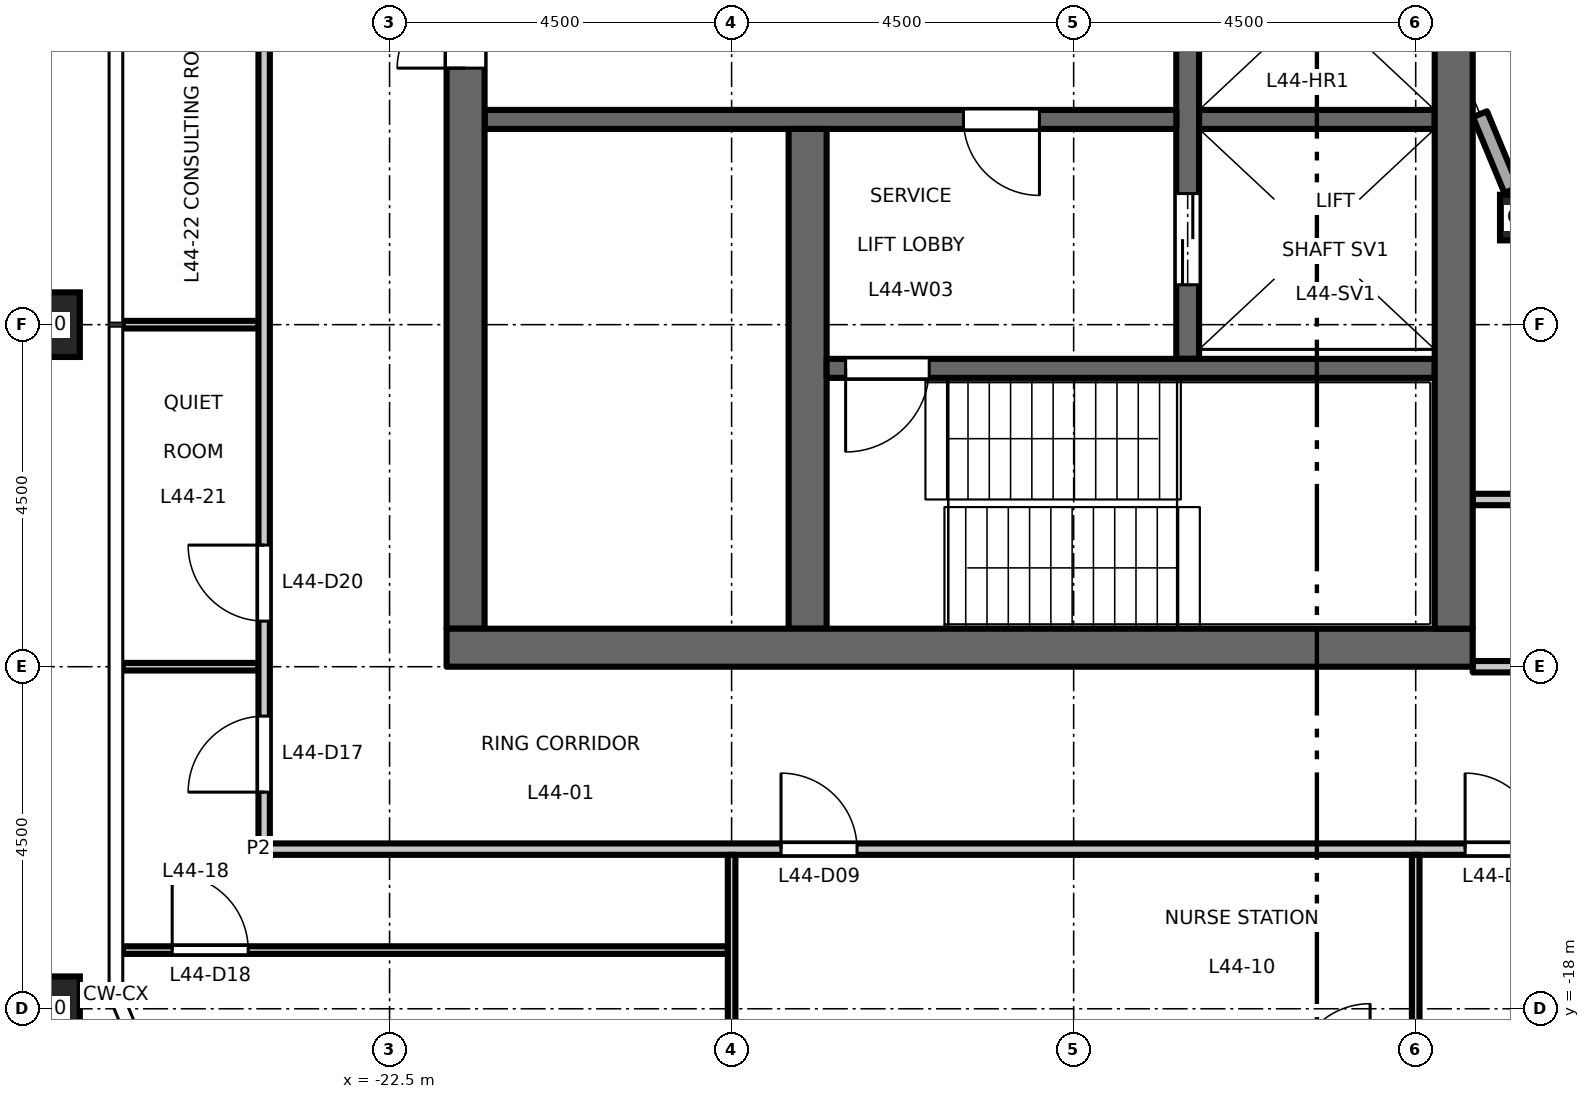
"""IFC4 building model, lengths in metres.
Left out: names, types, materials, properties, quantities, classifications, styles, units other than length and angle.
Written with IfcOpenShell. Run it as: python <this file> out.ifc"""

import sys

from ifc_helpers import new_model, si_unit, direction, frame, frame_2d, origin, origin_2d, place, context, subcontext, project, spatial, rectangle, hollow_rectangle, extrude, element, fill, save


model = new_model("IFC4")
c1 = context("Model", 3, precision=1e-05, world=origin(), true_north=direction((0.0, 1.0)))
c2 = subcontext(c1, "Body", "Model", "MODEL_VIEW")
j1 = project(units=[si_unit("LENGTHUNIT", "METRE"), si_unit("PLANEANGLEUNIT", "RADIAN")], contexts=[c1])
p1 = place(None, origin())
s1 = spatial("IfcSite", under=j1, at=p1, CompositionType="ELEMENT")
p2 = place(p1, origin())
s2 = spatial("IfcBuilding", under=s1, at=p2, CompositionType="ELEMENT")
p3 = place(p2, frame((0.0, 0.0, 206.2)))
s3 = spatial("IfcBuildingStorey", under=s2, at=p3, CompositionType="ELEMENT", Elevation=206.2)
for number, where, z_axis, x_axis in (
    (1, (-27.0, -9.0, 0.0), (0.0, 0.0, 1.0), (1.0, 0.0, 0.0)),
    (2, (-27.0, -18.0, 0.0), (0.0, 0.0, 1.0), (1.0, 0.0, 0.0)),
):
    element("IfcColumn", number, at=place(p3, frame(where, z_axis=z_axis, x_axis=x_axis)), inside=s3, PredefinedType="COLUMN", context=c2, shape_type="SweptSolid", body=[
        extrude(hollow_rectangle(XDim=0.85, YDim=0.85, WallThickness=0.05, at=origin_2d()), origin(), (0.0, 0.0, 1.0), 4.5),
    ])
p4 = place(p3, frame((-7.591, -7.591, 0.0), z_axis=(0.0, 0.0, 1.0), x_axis=(1.0, 0.0, 0.0)))
e3 = element("IfcColumn", 3, at=p4, inside=s3, PredefinedType="COLUMN", context=c2, shape_type="SweptSolid", body=[
    extrude(hollow_rectangle(XDim=0.6, YDim=0.6, WallThickness=0.032, at=origin_2d()), origin(), (0.0, 0.0, 1.0), 4.5),
])
p5 = place(p3, frame((-12.0, -9.45, 0.0), z_axis=(0.0, 0.0, 1.0), x_axis=(0.0, 1.0, 0.0)))
e4 = element("IfcWall", 4, at=p5, inside=s3, PredefinedType="SHEAR", context=c2, shape_type="SweptSolid", body=[
    extrude(rectangle(XDim=18.9, YDim=0.3, at=frame_2d((9.45, 0.0))), origin(), (0.0, 0.0, 1.0), 4.35),
])
p6 = place(p5, frame((4.725, 0.0, 0.0)))
e5 = element("IfcOpeningElement", 5, at=p6, cuts=e4, PredefinedType="OPENING", context=c2, shape_type="SweptSolid", body=[
    extrude(rectangle(XDim=1.1, YDim=2.1, at=frame_2d((0.55, 1.05))), frame((0.0, 0.16, 0.0), z_axis=(0.0, -1.0, 0.0), x_axis=(1.0, 0.0, 0.0)), (0.0, 0.0, 1.0), 0.32),
])
p7 = place(p5, frame((7.875, 0.0, 0.0)))
e6 = element("IfcOpeningElement", 6, at=p7, cuts=e4, PredefinedType="OPENING", context=c2, shape_type="SweptSolid", body=[
    extrude(rectangle(XDim=1.1, YDim=2.1, at=frame_2d((0.55, 1.05))), frame((0.0, 0.16, 0.0), z_axis=(0.0, -1.0, 0.0), x_axis=(1.0, 0.0, 0.0)), (0.0, 0.0, 1.0), 0.32),
])
p8 = place(p5, frame((11.025, 0.0, 0.0)))
e7 = element("IfcOpeningElement", 7, at=p8, cuts=e4, PredefinedType="OPENING", context=c2, shape_type="SweptSolid", body=[
    extrude(rectangle(XDim=1.1, YDim=2.1, at=frame_2d((0.55, 1.05))), frame((0.0, 0.16, 0.0), z_axis=(0.0, -1.0, 0.0), x_axis=(1.0, 0.0, 0.0)), (0.0, 0.0, 1.0), 0.32),
])
p9 = place(p5, frame((14.175, 0.0, 0.0)))
e8 = element("IfcOpeningElement", 8, at=p9, cuts=e4, PredefinedType="OPENING", context=c2, shape_type="SweptSolid", body=[
    extrude(rectangle(XDim=1.1, YDim=2.1, at=frame_2d((0.55, 1.05))), frame((0.0, 0.16, 0.0), z_axis=(0.0, -1.0, 0.0), x_axis=(1.0, 0.0, 0.0)), (0.0, 0.0, 1.0), 0.32),
])
p10 = place(p5, frame((16.725, 0.0, 0.0)))
e9 = element("IfcOpeningElement", 9, at=p10, cuts=e4, PredefinedType="OPENING", context=c2, shape_type="SweptSolid", body=[
    extrude(rectangle(XDim=1.2, YDim=2.1, at=frame_2d((0.6, 1.05))), frame((0.0, 0.16, 0.0), z_axis=(0.0, -1.0, 0.0), x_axis=(1.0, 0.0, 0.0)), (0.0, 0.0, 1.0), 0.32),
])
p11 = place(p5, frame((0.975, 0.0, 0.0)))
e10 = element("IfcOpeningElement", 10, at=p11, cuts=e4, PredefinedType="OPENING", context=c2, shape_type="SweptSolid", body=[
    extrude(rectangle(XDim=1.2, YDim=2.1, at=frame_2d((0.6, 1.05))), frame((0.0, 0.16, 0.0), z_axis=(0.0, -1.0, 0.0), x_axis=(1.0, 0.0, 0.0)), (0.0, 0.0, 1.0), 0.32),
])
p12 = place(p3, frame((-12.15, -6.3, 0.0), z_axis=(0.0, 0.0, 1.0), x_axis=(-1.0, 0.0, 0.0)))
e11 = element("IfcWall", 11, at=p12, inside=s3, PredefinedType="SHEAR", context=c2, shape_type="SweptSolid", body=[
    extrude(rectangle(XDim=9.1, YDim=0.25, at=frame_2d((4.55, 0.0))), origin(), (0.0, 0.0, 1.0), 4.35),
])
p13 = place(p12, frame((1.8, 0.0, 0.0)))
e12 = element("IfcOpeningElement", 12, at=p13, cuts=e11, PredefinedType="OPENING", context=c2, shape_type="SweptSolid", body=[
    extrude(rectangle(XDim=1.0, YDim=2.1, at=frame_2d((0.5, 1.05))), frame((0.0, 0.135, 0.0), z_axis=(0.0, -1.0, 0.0), x_axis=(1.0, 0.0, 0.0)), (0.0, 0.0, 1.0), 0.27),
])
p14 = place(p3, frame((-21.5, -13.0, 0.0), z_axis=(0.0, 0.0, 1.0), x_axis=(0.0, 1.0, 0.0)))
e13 = element("IfcWall", 13, at=p14, inside=s3, PredefinedType="SHEAR", context=c2, shape_type="SweptSolid", body=[
    extrude(rectangle(XDim=26.0, YDim=0.5, at=frame_2d((13.0, 0.0))), origin(), (0.0, 0.0, 1.0), 4.35),
])
p15 = place(p14, frame((16.825, 0.0, 0.0)))
e14 = element("IfcOpeningElement", 14, at=p15, cuts=e13, PredefinedType="OPENING", context=c2, shape_type="SweptSolid", body=[
    extrude(rectangle(XDim=1.8, YDim=2.1, at=frame_2d((0.9, 1.05))), frame((0.0, 0.26, 0.0), z_axis=(0.0, -1.0, 0.0), x_axis=(1.0, 0.0, 0.0)), (0.0, 0.0, 1.0), 0.52),
])
p16 = place(p14, frame((7.375, 0.0, 0.0)))
e15 = element("IfcOpeningElement", 15, at=p16, cuts=e13, PredefinedType="OPENING", context=c2, shape_type="SweptSolid", body=[
    extrude(rectangle(XDim=1.8, YDim=2.1, at=frame_2d((0.9, 1.05))), frame((0.0, 0.26, 0.0), z_axis=(0.0, -1.0, 0.0), x_axis=(1.0, 0.0, 0.0)), (0.0, 0.0, 1.0), 0.52),
])
p17 = place(p14, frame((14.125, 0.0, 0.0)))
e16 = element("IfcOpeningElement", 16, at=p17, cuts=e13, PredefinedType="OPENING", context=c2, shape_type="SweptSolid", body=[
    extrude(rectangle(XDim=0.9, YDim=2.1, at=frame_2d((0.45, 1.05))), frame((0.0, 0.26, 0.0), z_axis=(0.0, -1.0, 0.0), x_axis=(1.0, 0.0, 0.0)), (0.0, 0.0, 1.0), 0.52),
])
p18 = place(p3, frame((-17.0, -13.0, 0.0), z_axis=(0.0, 0.0, 1.0), x_axis=(0.0, 1.0, 0.0)))
e17 = element("IfcWall", 17, at=p18, inside=s3, PredefinedType="SHEAR", context=c2, shape_type="SweptSolid", body=[
    extrude(rectangle(XDim=6.575, YDim=0.5, at=frame_2d((3.288, 0.0))), origin(), (0.0, 0.0, 1.0), 4.35),
])
p19 = place(p3, frame((-8.75, -6.3, 0.0), z_axis=(0.0, 0.0, 1.0), x_axis=(-1.0, 0.0, 0.0)))
e18 = element("IfcWall", 18, at=p19, inside=s3, PredefinedType="SHEAR", context=c2, shape_type="SweptSolid", body=[
    extrude(rectangle(XDim=3.1, YDim=0.25, at=frame_2d((1.55, 0.0))), origin(), (0.0, 0.0, 1.0), 4.35),
])
p20 = place(p3, frame((-8.75, -9.575, 0.0), z_axis=(0.0, 0.0, 1.0), x_axis=(-1.0, 0.0, 0.0)))
e19 = element("IfcWall", 19, at=p20, inside=s3, PredefinedType="SHEAR", context=c2, shape_type="SweptSolid", body=[
    extrude(rectangle(XDim=8.0, YDim=0.25, at=frame_2d((4.0, 0.0))), origin(), (0.0, 0.0, 1.0), 4.35),
])
p21 = place(p20, frame((6.65, 0.0, 0.0)))
e20 = element("IfcOpeningElement", 20, at=p21, cuts=e19, PredefinedType="OPENING", context=c2, shape_type="SweptSolid", body=[
    extrude(rectangle(XDim=1.1, YDim=2.1, at=frame_2d((0.55, 1.05))), frame((0.0, 0.135, 0.0), z_axis=(0.0, -1.0, 0.0), x_axis=(1.0, 0.0, 0.0)), (0.0, 0.0, 1.0), 0.27),
])
p22 = place(p3, frame((-8.25, -13.25, 0.0), z_axis=(0.0, 0.0, 1.0), x_axis=(-1.0, 0.0, 0.0)))
e21 = element("IfcWall", 21, at=p22, inside=s3, PredefinedType="SHEAR", context=c2, shape_type="SweptSolid", body=[
    extrude(rectangle(XDim=13.5, YDim=0.5, at=frame_2d((6.75, 0.0))), origin(), (0.0, 0.0, 1.0), 4.35),
])
p23 = place(p3, frame((-8.5, -13.0, 0.0), z_axis=(0.0, 0.0, 1.0), x_axis=(0.0, 1.0, 0.0)))
e22 = element("IfcWall", 22, at=p23, inside=s3, PredefinedType="SHEAR", context=c2, shape_type="SweptSolid", body=[
    extrude(rectangle(XDim=26.0, YDim=0.5, at=frame_2d((13.0, 0.0))), origin(), (0.0, 0.0, 1.0), 4.35),
])
p24 = place(p3, frame((-8.154, -6.231, 0.0), z_axis=(0.0, 0.0, 1.0), x_axis=(0.382704496366, -0.923870807235, 0.0)))
e23 = element("IfcWall", 23, at=p24, inside=s3, PredefinedType="STANDARD", context=c2, shape_type="SweptSolid", body=[
    extrude(rectangle(XDim=1.08, YDim=0.2, at=frame_2d((0.54, 0.0))), origin(), (0.0, 0.0, 1.0), 3.918),
])
p25 = place(p3, frame((-26.01, -17.228, 0.0), z_axis=(0.0, 0.0, 1.0), x_axis=(1.0, 0.0, 0.0)))
e24 = element("IfcWall", 24, at=p25, inside=s3, PredefinedType="PARTITIONING", context=c2, shape_type="SweptSolid", body=[
    extrude(rectangle(XDim=7.96, YDim=0.1, at=frame_2d((3.98, 0.0))), origin(), (0.0, 0.0, 1.0), 4.35),
])
p26 = place(p25, frame((0.65, 0.0, 0.0)))
e25 = element("IfcOpeningElement", 25, at=p26, cuts=e24, PredefinedType="OPENING", context=c2, shape_type="SweptSolid", body=[
    extrude(rectangle(XDim=1.0, YDim=2.1, at=frame_2d((0.5, 1.05))), frame((0.0, 0.06, 0.0), z_axis=(0.0, -1.0, 0.0), x_axis=(1.0, 0.0, 0.0)), (0.0, 0.0, 1.0), 0.12),
])
p27 = place(p3, frame((-24.225, -15.9, 0.0), z_axis=(0.0, 0.0, 1.0), x_axis=(1.0, 0.0, 0.0)))
e26 = element("IfcWall", 26, at=p27, inside=s3, PredefinedType="PARTITIONING", context=c2, shape_type="SweptSolid", body=[
    extrude(rectangle(XDim=48.45, YDim=0.15, at=frame_2d((24.225, 0.0))), origin(), (0.0, 0.0, 1.0), 4.35),
])
p28 = place(p27, frame((6.875, 0.0, 0.0)))
e27 = element("IfcOpeningElement", 27, at=p28, cuts=e26, PredefinedType="OPENING", context=c2, shape_type="SweptSolid", body=[
    extrude(rectangle(XDim=1.0, YDim=2.1, at=frame_2d((0.5, 1.05))), frame((0.0, 0.085, 0.0), z_axis=(0.0, -1.0, 0.0), x_axis=(1.0, 0.0, 0.0)), (0.0, 0.0, 1.0), 0.17),
])
p29 = place(p27, frame((15.875, 0.0, 0.0)))
e28 = element("IfcOpeningElement", 28, at=p29, cuts=e26, PredefinedType="OPENING", context=c2, shape_type="SweptSolid", body=[
    extrude(rectangle(XDim=1.0, YDim=2.1, at=frame_2d((0.5, 1.05))), frame((0.0, 0.085, 0.0), z_axis=(0.0, -1.0, 0.0), x_axis=(1.0, 0.0, 0.0)), (0.0, 0.0, 1.0), 0.17),
])
p30 = place(p27, frame((24.875, 0.0, 0.0)))
e29 = element("IfcOpeningElement", 29, at=p30, cuts=e26, PredefinedType="OPENING", context=c2, shape_type="SweptSolid", body=[
    extrude(rectangle(XDim=1.0, YDim=2.1, at=frame_2d((0.5, 1.05))), frame((0.0, 0.085, 0.0), z_axis=(0.0, -1.0, 0.0), x_axis=(1.0, 0.0, 0.0)), (0.0, 0.0, 1.0), 0.17),
])
p31 = place(p27, frame((40.625, 0.0, 0.0)))
e30 = element("IfcOpeningElement", 30, at=p31, cuts=e26, PredefinedType="OPENING", context=c2, shape_type="SweptSolid", body=[
    extrude(rectangle(XDim=1.0, YDim=2.1, at=frame_2d((0.5, 1.05))), frame((0.0, 0.085, 0.0), z_axis=(0.0, -1.0, 0.0), x_axis=(1.0, 0.0, 0.0)), (0.0, 0.0, 1.0), 0.17),
])
p32 = place(p27, frame((42.875, 0.0, 0.0)))
e31 = element("IfcOpeningElement", 31, at=p32, cuts=e26, PredefinedType="OPENING", context=c2, shape_type="SweptSolid", body=[
    extrude(rectangle(XDim=1.0, YDim=2.1, at=frame_2d((0.5, 1.05))), frame((0.0, 0.085, 0.0), z_axis=(0.0, -1.0, 0.0), x_axis=(1.0, 0.0, 0.0)), (0.0, 0.0, 1.0), 0.17),
])
p33 = place(p3, frame((-26.01, -13.5, 0.0), z_axis=(0.0, 0.0, 1.0), x_axis=(1.0, 0.0, 0.0)))
e32 = element("IfcWall", 32, at=p33, inside=s3, PredefinedType="PARTITIONING", context=c2, shape_type="SweptSolid", body=[
    extrude(rectangle(XDim=1.785, YDim=0.1, at=frame_2d((0.893, 0.0))), origin(), (0.0, 0.0, 1.0), 3.95),
])
p34 = place(p3, frame((-8.25, -13.5, 0.0), z_axis=(0.0, 0.0, 1.0), x_axis=(1.0, 0.0, 0.0)))
e33 = element("IfcWall", 33, at=p34, inside=s3, PredefinedType="PARTITIONING", context=c2, shape_type="SweptSolid", body=[
    extrude(rectangle(XDim=16.5, YDim=0.15, at=frame_2d((8.25, 0.0))), origin(), (0.0, 0.0, 1.0), 3.95),
])
p35 = place(p34, frame((0.6, 0.0, 0.0)))
e34 = element("IfcOpeningElement", 34, at=p35, cuts=e33, PredefinedType="OPENING", context=c2, shape_type="SweptSolid", body=[
    extrude(rectangle(XDim=1.0, YDim=2.1, at=frame_2d((0.5, 1.05))), frame((0.0, 0.085, 0.0), z_axis=(0.0, -1.0, 0.0), x_axis=(1.0, 0.0, 0.0)), (0.0, 0.0, 1.0), 0.17),
])
p36 = place(p3, frame((-8.25, -11.3, 0.0), z_axis=(0.0, 0.0, 1.0), x_axis=(1.0, 0.0, 0.0)))
e35 = element("IfcWall", 35, at=p36, inside=s3, PredefinedType="PARTITIONING", context=c2, shape_type="SweptSolid", body=[
    extrude(rectangle(XDim=14.79, YDim=0.15, at=frame_2d((7.395, 0.0))), origin(), (0.0, 0.0, 1.0), 4.35),
])
p37 = place(p36, frame((4.35, 0.0, 0.0)))
e36 = element("IfcOpeningElement", 36, at=p37, cuts=e35, PredefinedType="OPENING", context=c2, shape_type="SweptSolid", body=[
    extrude(rectangle(XDim=1.0, YDim=2.1, at=frame_2d((0.5, 1.05))), frame((0.0, 0.085, 0.0), z_axis=(0.0, -1.0, 0.0), x_axis=(1.0, 0.0, 0.0)), (0.0, 0.0, 1.0), 0.17),
])
p38 = place(p36, frame((6.6, 0.0, 0.0)))
e37 = element("IfcOpeningElement", 37, at=p38, cuts=e35, PredefinedType="OPENING", context=c2, shape_type="SweptSolid", body=[
    extrude(rectangle(XDim=1.0, YDim=2.1, at=frame_2d((0.5, 1.05))), frame((0.0, 0.085, 0.0), z_axis=(0.0, -1.0, 0.0), x_axis=(1.0, 0.0, 0.0)), (0.0, 0.0, 1.0), 0.17),
])
p39 = place(p36, frame((13.14, 0.0, 0.0)))
e38 = element("IfcOpeningElement", 38, at=p39, cuts=e35, PredefinedType="OPENING", context=c2, shape_type="SweptSolid", body=[
    extrude(rectangle(XDim=1.0, YDim=2.1, at=frame_2d((0.5, 1.05))), frame((0.0, 0.085, 0.0), z_axis=(0.0, -1.0, 0.0), x_axis=(1.0, 0.0, 0.0)), (0.0, 0.0, 1.0), 0.17),
])
p40 = place(p3, frame((-26.01, -9.0, 0.0), z_axis=(0.0, 0.0, 1.0), x_axis=(1.0, 0.0, 0.0)))
e39 = element("IfcWall", 39, at=p40, inside=s3, PredefinedType="PARTITIONING", context=c2, shape_type="SweptSolid", body=[
    extrude(rectangle(XDim=1.785, YDim=0.1, at=frame_2d((0.893, 0.0))), origin(), (0.0, 0.0, 1.0), 4.35),
])
p41 = place(p3, frame((-24.15, -15.825, 0.0), z_axis=(0.0, 0.0, 1.0), x_axis=(0.0, 1.0, 0.0)))
e40 = element("IfcWall", 40, at=p41, inside=s3, PredefinedType="PARTITIONING", context=c2, shape_type="SweptSolid", body=[
    extrude(rectangle(XDim=31.65, YDim=0.15, at=frame_2d((15.825, 0.0))), origin(), (0.0, 0.0, 1.0), 4.35),
])
p42 = place(p41, frame((0.675, 0.0, 0.0)))
e41 = element("IfcOpeningElement", 41, at=p42, cuts=e40, PredefinedType="OPENING", context=c2, shape_type="SweptSolid", body=[
    extrude(rectangle(XDim=1.0, YDim=2.1, at=frame_2d((0.5, 1.05))), frame((0.0, 0.085, 0.0), z_axis=(0.0, -1.0, 0.0), x_axis=(1.0, 0.0, 0.0)), (0.0, 0.0, 1.0), 0.17),
])
p43 = place(p41, frame((2.925, 0.0, 0.0)))
e42 = element("IfcOpeningElement", 42, at=p43, cuts=e40, PredefinedType="OPENING", context=c2, shape_type="SweptSolid", body=[
    extrude(rectangle(XDim=1.0, YDim=2.1, at=frame_2d((0.5, 1.05))), frame((0.0, 0.085, 0.0), z_axis=(0.0, -1.0, 0.0), x_axis=(1.0, 0.0, 0.0)), (0.0, 0.0, 1.0), 0.17),
])
p44 = place(p41, frame((14.175, 0.0, 0.0)))
e43 = element("IfcOpeningElement", 43, at=p44, cuts=e40, PredefinedType="OPENING", context=c2, shape_type="SweptSolid", body=[
    extrude(rectangle(XDim=1.0, YDim=2.1, at=frame_2d((0.5, 1.05))), frame((0.0, 0.085, 0.0), z_axis=(0.0, -1.0, 0.0), x_axis=(1.0, 0.0, 0.0)), (0.0, 0.0, 1.0), 0.17),
])
p45 = place(p41, frame((16.425, 0.0, 0.0)))
e44 = element("IfcOpeningElement", 44, at=p45, cuts=e40, PredefinedType="OPENING", context=c2, shape_type="SweptSolid", body=[
    extrude(rectangle(XDim=1.0, YDim=2.1, at=frame_2d((0.5, 1.05))), frame((0.0, 0.085, 0.0), z_axis=(0.0, -1.0, 0.0), x_axis=(1.0, 0.0, 0.0)), (0.0, 0.0, 1.0), 0.17),
])
p46 = place(p41, frame((27.675, 0.0, 0.0)))
e45 = element("IfcOpeningElement", 45, at=p46, cuts=e40, PredefinedType="OPENING", context=c2, shape_type="SweptSolid", body=[
    extrude(rectangle(XDim=1.0, YDim=2.1, at=frame_2d((0.5, 1.05))), frame((0.0, 0.085, 0.0), z_axis=(0.0, -1.0, 0.0), x_axis=(1.0, 0.0, 0.0)), (0.0, 0.0, 1.0), 0.17),
])
p47 = place(p3, frame((-18.0, -25.928, 0.0), z_axis=(0.0, 0.0, 1.0), x_axis=(0.0, 1.0, 0.0)))
e46 = element("IfcWall", 46, at=p47, inside=s3, PredefinedType="PARTITIONING", context=c2, shape_type="SweptSolid", body=[
    extrude(rectangle(XDim=9.953, YDim=0.1, at=frame_2d((4.977, 0.0))), origin(), (0.0, 0.0, 1.0), 3.65),
])
p48 = place(p3, frame((-9.0, -18.883, 0.0), z_axis=(0.0, 0.0, 1.0), x_axis=(0.0, 1.0, 0.0)))
e47 = element("IfcWall", 47, at=p48, inside=s3, PredefinedType="PARTITIONING", context=c2, shape_type="SweptSolid", body=[
    extrude(rectangle(XDim=2.908, YDim=0.1, at=frame_2d((1.454, 0.0))), origin(), (0.0, 0.0, 1.0), 3.65),
])
p49 = place(p13, origin())
e48 = element("IfcDoor", 48, at=p49, inside=s3, OperationType="SINGLE_SWING_RIGHT", PredefinedType="DOOR", context=c2, shape_type="SweptSolid", body=[
    extrude(rectangle(XDim=1.0, YDim=2.1, at=frame_2d((0.5, 1.05))), frame((0.0, 0.025, 0.0), z_axis=(0.0, -1.0, 0.0), x_axis=(1.0, 0.0, 0.0)), (0.0, 0.0, 1.0), 0.05),
])
fill(e12, e48)
p50 = place(p21, origin())
e49 = element("IfcDoor", 49, at=p50, inside=s3, OperationType="SINGLE_SWING_LEFT", PredefinedType="DOOR", context=c2, shape_type="SweptSolid", body=[
    extrude(rectangle(XDim=1.1, YDim=2.1, at=frame_2d((0.55, 1.05))), frame((0.0, 0.025, 0.0), z_axis=(0.0, -1.0, 0.0), x_axis=(1.0, 0.0, 0.0)), (0.0, 0.0, 1.0), 0.05),
])
fill(e20, e49)
p51 = place(p16, origin())
e50 = element("IfcDoor", 50, at=p51, inside=s3, OperationType="DOUBLE_DOOR_DOUBLE_SWING", PredefinedType="DOOR", context=c2, shape_type="SweptSolid", body=[
    extrude(rectangle(XDim=1.8, YDim=2.1, at=frame_2d((0.9, 1.05))), frame((0.0, 0.025, 0.0), z_axis=(0.0, -1.0, 0.0), x_axis=(1.0, 0.0, 0.0)), (0.0, 0.0, 1.0), 0.05),
])
fill(e15, e50)
p52 = place(p11, origin())
e51 = element("IfcDoor", 51, at=p52, inside=s3, OperationType="DOUBLE_DOOR_SLIDING", PredefinedType="DOOR", context=c2, shape_type="SweptSolid", body=[
    extrude(rectangle(XDim=1.2, YDim=2.1, at=frame_2d((0.6, 1.05))), frame((0.0, 0.025, 0.0), z_axis=(0.0, -1.0, 0.0), x_axis=(1.0, 0.0, 0.0)), (0.0, 0.0, 1.0), 0.05),
])
fill(e10, e51)
p53 = place(p28, origin())
e52 = element("IfcDoor", 52, at=p53, inside=s3, OperationType="SINGLE_SWING_LEFT", PredefinedType="DOOR", context=c2, shape_type="SweptSolid", body=[
    extrude(rectangle(XDim=1.0, YDim=2.1, at=frame_2d((0.5, 1.05))), frame((0.0, 0.025, 0.0), z_axis=(0.0, -1.0, 0.0), x_axis=(1.0, 0.0, 0.0)), (0.0, 0.0, 1.0), 0.05),
])
fill(e27, e52)
p54 = place(p29, origin())
e53 = element("IfcDoor", 53, at=p54, inside=s3, OperationType="SINGLE_SWING_LEFT", PredefinedType="DOOR", context=c2, shape_type="SweptSolid", body=[
    extrude(rectangle(XDim=1.0, YDim=2.1, at=frame_2d((0.5, 1.05))), frame((0.0, 0.025, 0.0), z_axis=(0.0, -1.0, 0.0), x_axis=(1.0, 0.0, 0.0)), (0.0, 0.0, 1.0), 0.05),
])
fill(e28, e53)
p55 = place(p42, origin())
e54 = element("IfcDoor", 54, at=p55, inside=s3, OperationType="SINGLE_SWING_LEFT", PredefinedType="DOOR", context=c2, shape_type="SweptSolid", body=[
    extrude(rectangle(XDim=1.0, YDim=2.1, at=frame_2d((0.5, 1.05))), frame((0.0, 0.025, 0.0), z_axis=(0.0, -1.0, 0.0), x_axis=(1.0, 0.0, 0.0)), (0.0, 0.0, 1.0), 0.05),
])
fill(e41, e54)
p56 = place(p26, origin())
e55 = element("IfcDoor", 55, at=p56, inside=s3, OperationType="SINGLE_SWING_LEFT", PredefinedType="DOOR", context=c2, shape_type="SweptSolid", body=[
    extrude(rectangle(XDim=1.0, YDim=2.1, at=frame_2d((0.5, 1.05))), frame((0.0, 0.025, 0.0), z_axis=(0.0, -1.0, 0.0), x_axis=(1.0, 0.0, 0.0)), (0.0, 0.0, 1.0), 0.05),
])
fill(e25, e55)
p57 = place(p43, origin())
e56 = element("IfcDoor", 56, at=p57, inside=s3, OperationType="SINGLE_SWING_RIGHT", PredefinedType="DOOR", context=c2, shape_type="SweptSolid", body=[
    extrude(rectangle(XDim=1.0, YDim=2.1, at=frame_2d((0.5, 1.05))), frame((0.0, 0.025, 0.0), z_axis=(0.0, -1.0, 0.0), x_axis=(1.0, 0.0, 0.0)), (0.0, 0.0, 1.0), 0.05),
])
fill(e42, e56)
save(model, sys.argv[1])
